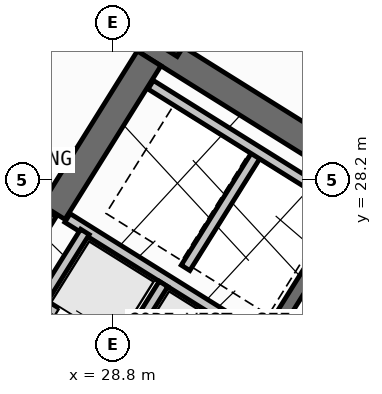
"""IFC4 building model, lengths in metres.
Left out: names, types, materials, properties, quantities, classifications, styles, units other than length and angle.
Written with IfcOpenShell. Run it as: python <this file> out.ifc"""

import sys

from ifc_helpers import new_model, si_unit, direction, frame, frame_2d, origin, origin_2d, place, context, subcontext, project, spatial, rectangle, hollow_rectangle, extrude, source, transform, mapped, element, fill, save


model = new_model("IFC4")
c1 = context("Model", 3, precision=1e-05, world=origin(), true_north=direction((0.0, 1.0)))
c2 = subcontext(c1, "Body", "Model", "MODEL_VIEW")
j1 = project(units=[si_unit("LENGTHUNIT", "METRE"), si_unit("PLANEANGLEUNIT", "RADIAN")], contexts=[c1])
p1 = place(None, origin())
s1 = spatial("IfcSite", under=j1, at=p1, CompositionType="ELEMENT")
p2 = place(p1, origin())
s2 = spatial("IfcBuilding", under=s1, at=p2, CompositionType="ELEMENT")
p3 = place(p2, frame((0.0, 0.0, 108.9)))
s3 = spatial("IfcBuildingStorey", under=s2, at=p3, CompositionType="ELEMENT", Elevation=108.9)
p4 = place(p3, frame((40.573, 24.01, 0.0), z_axis=(0.0, 0.0, 1.0), x_axis=(-0.848047359947, 0.529920442413, 0.0)))
e1 = element("IfcWall", 1, at=p4, inside=s3, PredefinedType="SHEAR", context=c2, shape_type="SweptSolid", body=[
    extrude(rectangle(XDim=13.14, YDim=0.55, at=frame_2d((6.57, 0.0))), origin(), (0.0, 0.0, 1.0), 3.35),
])
p5 = place(p3, frame((29.517, 30.594, 0.0), z_axis=(0.0, 0.0, 1.0), x_axis=(-0.529906864564, -0.848055844204, 0.0)))
e2 = element("IfcWall", 2, at=p5, inside=s3, PredefinedType="SHEAR", context=c2, shape_type="SweptSolid", body=[
    extrude(rectangle(XDim=3.575, YDim=0.55, at=frame_2d((1.788, 0.0))), origin(), (0.0, 0.0, 1.0), 3.35),
])
m1 = source(origin(), c2, "Body", "SweptSolid", [
    extrude(hollow_rectangle(XDim=0.9, YDim=0.9, WallThickness=0.036, at=origin_2d()), origin(), (0.0, 0.0, 1.0), 3.6),
])
p6 = place(p3, frame((29.928, 31.251, 0.0), z_axis=(0.0, 0.0, 1.0), x_axis=(-0.848048096156, 0.529919264233, 0.0)))
e3 = element("IfcColumn", 3, at=p6, inside=s3, PredefinedType="COLUMN", context=c2, shape_type="MappedRepresentation", body=[
    mapped(m1, transform((0.0, 0.0, 0.0), scale=1.0)),
])
p7 = place(p3, frame((31.76, 12.183, 0.0), z_axis=(0.0, 0.0, 1.0), x_axis=(-0.848047074256, 0.529920899612, 0.0)))
e4 = element("IfcWall", 4, at=p7, inside=s3, PredefinedType="STANDARD", context=c2, shape_type="SweptSolid", body=[
    extrude(rectangle(XDim=30.652, YDim=0.32, at=frame_2d((15.326, 0.0))), origin(), (0.0, 0.0, 1.0), 3.35),
])
p8 = place(p7, frame((15.153, 0.0, 0.0)))
e5 = element("IfcOpeningElement", 5, at=p8, cuts=e4, PredefinedType="OPENING", context=c2, shape_type="SweptSolid", body=[
    extrude(rectangle(XDim=1.2, YDim=2.15, at=frame_2d((0.6, 1.075))), frame((0.0, 0.17, 0.0), z_axis=(0.0, -1.0, 0.0), x_axis=(1.0, 0.0, 0.0)), (0.0, 0.0, 1.0), 0.34),
])
p9 = place(p7, frame((2.002, 0.0, 0.8)))
e6 = element("IfcOpeningElement", 6, at=p9, cuts=e4, PredefinedType="OPENING", context=c2, shape_type="SweptSolid", body=[
    extrude(rectangle(XDim=2.1, YDim=1.55, at=frame_2d((1.05, 0.775))), frame((0.0, 0.17, 0.0), z_axis=(0.0, -1.0, 0.0), x_axis=(1.0, 0.0, 0.0)), (0.0, 0.0, 1.0), 0.34),
])
p10 = place(p7, frame((7.206, 0.0, 0.8)))
e7 = element("IfcOpeningElement", 7, at=p10, cuts=e4, PredefinedType="OPENING", context=c2, shape_type="SweptSolid", body=[
    extrude(rectangle(XDim=2.1, YDim=1.55, at=frame_2d((1.05, 0.775))), frame((0.0, 0.17, 0.0), z_axis=(0.0, -1.0, 0.0), x_axis=(1.0, 0.0, 0.0)), (0.0, 0.0, 1.0), 0.34),
])
p11 = place(p7, frame((12.648, 0.0, 1.0)))
e8 = element("IfcOpeningElement", 8, at=p11, cuts=e4, PredefinedType="OPENING", context=c2, shape_type="SweptSolid", body=[
    extrude(rectangle(XDim=0.9, YDim=1.25, at=frame_2d((0.45, 0.625))), frame((0.0, 0.17, 0.0), z_axis=(0.0, -1.0, 0.0), x_axis=(1.0, 0.0, 0.0)), (0.0, 0.0, 1.0), 0.34),
])
p12 = place(p7, frame((19.59, 0.0, 0.95)))
e9 = element("IfcOpeningElement", 9, at=p12, cuts=e4, PredefinedType="OPENING", context=c2, shape_type="SweptSolid", body=[
    extrude(rectangle(XDim=1.2, YDim=1.4, at=frame_2d((0.6, 0.7))), frame((0.0, 0.17, 0.0), z_axis=(0.0, -1.0, 0.0), x_axis=(1.0, 0.0, 0.0)), (0.0, 0.0, 1.0), 0.34),
])
p13 = place(p7, frame((25.966, 0.0, 1.0)))
e10 = element("IfcOpeningElement", 10, at=p13, cuts=e4, PredefinedType="OPENING", context=c2, shape_type="SweptSolid", body=[
    extrude(rectangle(XDim=0.9, YDim=1.25, at=frame_2d((0.45, 0.625))), frame((0.0, 0.17, 0.0), z_axis=(0.0, -1.0, 0.0), x_axis=(1.0, 0.0, 0.0)), (0.0, 0.0, 1.0), 0.34),
])
p14 = place(p7, frame((28.871, 0.0, 1.0)))
e11 = element("IfcOpeningElement", 11, at=p14, cuts=e4, PredefinedType="OPENING", context=c2, shape_type="SweptSolid", body=[
    extrude(rectangle(XDim=0.9, YDim=1.25, at=frame_2d((0.45, 0.625))), frame((0.0, 0.17, 0.0), z_axis=(0.0, -1.0, 0.0), x_axis=(1.0, 0.0, 0.0)), (0.0, 0.0, 1.0), 0.34),
])
p15 = place(p3, frame((33.496, 27.677, 0.0), z_axis=(0.0, 0.0, 1.0), x_axis=(-0.529908658664, -0.84805472316, 0.0)))
e12 = element("IfcWall", 12, at=p15, inside=s3, PredefinedType="SHEAR", context=c2, shape_type="SweptSolid", body=[
    extrude(rectangle(XDim=3.16, YDim=0.26, at=frame_2d((1.58, 0.0))), origin(), (0.0, 0.0, 1.0), 3.35),
])
p16 = place(p3, frame((31.822, 24.998, 0.0), z_axis=(0.0, 0.0, 1.0), x_axis=(-0.848036912365, 0.52993716162, 0.0)))
e13 = element("IfcWall", 13, at=p16, inside=s3, PredefinedType="STANDARD", context=c2, shape_type="SweptSolid", body=[
    extrude(rectangle(XDim=4.618, YDim=0.2, at=frame_2d((2.309, 0.0))), origin(), (0.0, 0.0, 1.0), 3.34),
])
p17 = place(p3, frame((32.108, 22.814, 0.0), z_axis=(0.0, 0.0, 1.0), x_axis=(-0.848042229521, 0.529928652696, 0.0)))
e14 = element("IfcWall", 14, at=p17, inside=s3, PredefinedType="STANDARD", context=c2, shape_type="SweptSolid", body=[
    extrude(rectangle(XDim=5.62, YDim=0.2, at=frame_2d((2.81, 0.0))), origin(), (0.0, 0.0, 1.0), 3.34),
])
p18 = place(p17, frame((0.39, 0.0, 0.0)))
e15 = element("IfcOpeningElement", 15, at=p18, cuts=e14, PredefinedType="OPENING", context=c2, shape_type="SweptSolid", body=[
    extrude(rectangle(XDim=1.1, YDim=2.15, at=frame_2d((0.55, 1.075))), frame((0.0, 0.11, 0.0), z_axis=(0.0, -1.0, 0.0), x_axis=(1.0, 0.0, 0.0)), (0.0, 0.0, 1.0), 0.22),
])
p19 = place(p17, frame((2.25, 0.0, 0.0)))
e16 = element("IfcOpeningElement", 16, at=p19, cuts=e14, PredefinedType="OPENING", context=c2, shape_type="SweptSolid", body=[
    extrude(rectangle(XDim=1.1, YDim=2.15, at=frame_2d((0.55, 1.075))), frame((0.0, 0.11, 0.0), z_axis=(0.0, -1.0, 0.0), x_axis=(1.0, 0.0, 0.0)), (0.0, 0.0, 1.0), 0.22),
])
p20 = place(p17, frame((4.11, 0.0, 0.0)))
e17 = element("IfcOpeningElement", 17, at=p20, cuts=e14, PredefinedType="OPENING", context=c2, shape_type="SweptSolid", body=[
    extrude(rectangle(XDim=1.1, YDim=2.15, at=frame_2d((0.55, 1.075))), frame((0.0, 0.11, 0.0), z_axis=(0.0, -1.0, 0.0), x_axis=(1.0, 0.0, 0.0)), (0.0, 0.0, 1.0), 0.22),
])
p21 = place(p3, frame((28.25, 27.17, 0.0), z_axis=(0.0, 0.0, 1.0), x_axis=(-0.529905827651, -0.848056492117, 0.0)))
e18 = element("IfcWall", 18, at=p21, inside=s3, PredefinedType="STANDARD", context=c2, shape_type="SweptSolid", body=[
    extrude(rectangle(XDim=1.65, YDim=0.2, at=frame_2d((0.825, 0.0))), origin(), (0.0, 0.0, 1.0), 3.34),
])
p22 = place(p3, frame((31.645, 28.716, 0.0), z_axis=(0.0, 0.0, 1.0), x_axis=(-0.52986693015, -0.848080795876, 0.0)))
e19 = element("IfcWall", 19, at=p22, inside=s3, PredefinedType="STANDARD", context=c2, shape_type="SweptSolid", body=[
    extrude(rectangle(XDim=2.66, YDim=0.2, at=frame_2d((1.33, 0.0))), origin(), (0.0, 0.0, 1.0), 3.34),
])
p23 = place(p3, frame((33.363, 27.69, 0.0), z_axis=(0.0, 0.0, 1.0), x_axis=(-0.848047090064, 0.529920874315, 0.0)))
e20 = element("IfcWall", 20, at=p23, inside=s3, PredefinedType="STANDARD", context=c2, shape_type="SweptSolid", body=[
    extrude(rectangle(XDim=4.498, YDim=0.2, at=frame_2d((2.249, 0.0))), origin(), (0.0, 0.0, 1.0), 3.34),
])
p24 = place(p3, frame((29.801, 26.142, 0.0), z_axis=(0.0, 0.0, 1.0), x_axis=(-0.529998940003, -0.847998304005, 0.0)))
e21 = element("IfcWall", 21, at=p24, inside=s3, PredefinedType="STANDARD", context=c2, shape_type="SweptSolid", body=[
    extrude(rectangle(XDim=1.58, YDim=0.2, at=frame_2d((0.79, 0.0))), origin(), (0.0, 0.0, 1.0), 3.34),
])
p25 = place(p3, frame((27.596, 27.52, 0.0), z_axis=(0.0, 0.0, 1.0), x_axis=(-0.529865479138, -0.848081702443, 0.0)))
e22 = element("IfcWall", 22, at=p25, inside=s3, PredefinedType="STANDARD", context=c2, shape_type="SweptSolid", body=[
    extrude(rectangle(XDim=2.96, YDim=0.2, at=frame_2d((1.48, 0.0))), origin(), (0.0, 0.0, 1.0), 3.34),
])
p26 = place(p25, frame((1.76, 0.0, 0.0)))
e23 = element("IfcOpeningElement", 23, at=p26, cuts=e22, PredefinedType="OPENING", context=c2, shape_type="SweptSolid", body=[
    extrude(rectangle(XDim=0.86, YDim=2.05, at=frame_2d((0.43, 1.025))), frame((0.0, 0.11, 0.0), z_axis=(0.0, -1.0, 0.0), x_axis=(1.0, 0.0, 0.0)), (0.0, 0.0, 1.0), 0.22),
])
p27 = place(p3, frame((31.239, 38.274, 0.0), z_axis=(0.0, 0.0, 1.0), x_axis=(-0.529925472745, -0.848044216616, 0.0)))
e24 = element("IfcWall", 24, at=p27, inside=s3, PredefinedType="PARTITIONING", context=c2, shape_type="SweptSolid", body=[
    extrude(rectangle(XDim=11.65, YDim=0.16, at=frame_2d((5.825, 0.0))), origin(), (0.0, 0.0, 1.0), 3.34),
])
p28 = place(p3, frame((41.936, 26.012, 0.0), z_axis=(0.0, 0.0, 1.0), x_axis=(-0.848051154596, 0.529914369676, 0.0)))
e25 = element("IfcWall", 25, at=p28, inside=s3, PredefinedType="PARTITIONING", context=c2, shape_type="SweptSolid", body=[
    extrude(rectangle(XDim=15.57, YDim=0.16, at=frame_2d((7.785, 0.0))), origin(), (0.0, 0.0, 1.0), 3.34),
])
p29 = place(p28, frame((10.83, 0.0, 0.0)))
e26 = element("IfcOpeningElement", 26, at=p29, cuts=e25, PredefinedType="OPENING", context=c2, shape_type="SweptSolid", body=[
    extrude(rectangle(XDim=1.0, YDim=2.1, at=frame_2d((0.5, 1.05))), frame((0.0, 0.09, 0.0), z_axis=(0.0, -1.0, 0.0), x_axis=(1.0, 0.0, 0.0)), (0.0, 0.0, 1.0), 0.18),
])
p30 = place(p3, frame((42.226, 28.873, 0.0), z_axis=(0.0, 0.0, 1.0), x_axis=(-0.848049134363, 0.529917602752, 0.0)))
e27 = element("IfcWall", 27, at=p30, inside=s3, PredefinedType="PLUMBINGWALL", context=c2, shape_type="SweptSolid", body=[
    extrude(rectangle(XDim=14.3, YDim=0.14, at=frame_2d((7.15, 0.0))), origin(), (0.0, 0.0, 1.0), 3.34),
])
p31 = place(p30, frame((9.57, 0.0, 0.0)))
e28 = element("IfcOpeningElement", 28, at=p31, cuts=e27, PredefinedType="OPENING", context=c2, shape_type="SweptSolid", body=[
    extrude(rectangle(XDim=0.92, YDim=2.08, at=frame_2d((0.46, 1.04))), frame((0.0, 0.08, 0.0), z_axis=(0.0, -1.0, 0.0), x_axis=(1.0, 0.0, 0.0)), (0.0, 0.0, 1.0), 0.16),
])
m2 = source(origin(), c2, "Body", "SweptSolid", [
    extrude(rectangle(XDim=1.1, YDim=2.15, at=frame_2d((0.55, 1.075))), frame((0.0, 0.025, 0.0), z_axis=(0.0, -1.0, 0.0), x_axis=(1.0, 0.0, 0.0)), (0.0, 0.0, 1.0), 0.05),
])
p32 = place(p20, origin())
e29 = element("IfcDoor", 29, at=p32, inside=s3, OperationType="DOUBLE_DOOR_SLIDING", PredefinedType="DOOR", context=c2, shape_type="MappedRepresentation", body=[
    mapped(m2, transform((0.0, 0.0, 0.0), scale=1.0)),
])
fill(e17, e29)
save(model, sys.argv[1])
